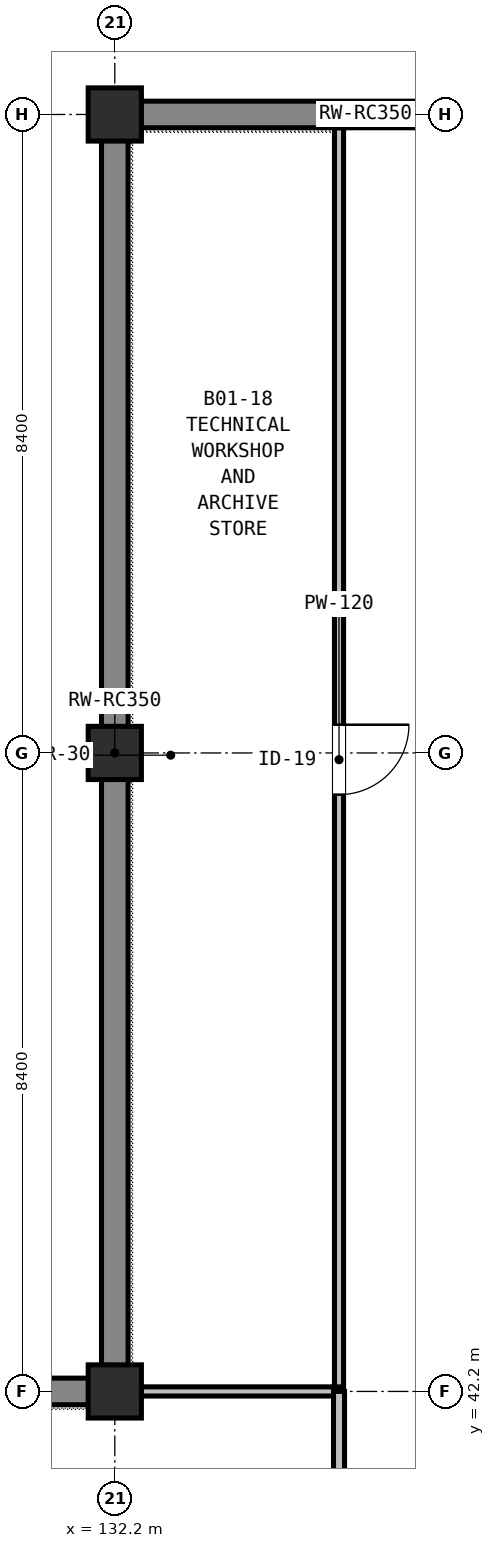
"""IFC4 building model, lengths in metres.
Left out: names, types, materials, properties, quantities, classifications, styles, units other than length and angle.
Written with IfcOpenShell. Run it as: python <this file> out.ifc"""

import sys

from ifc_helpers import new_model, si_unit, direction, frame, frame_2d, origin, origin_2d, place, context, subcontext, project, spatial, rectangle, extrude, element, fill, save


model = new_model("IFC4")
c1 = context("Model", 3, precision=1e-05, world=origin(), true_north=direction((0.0, 1.0)))
c2 = subcontext(c1, "Body", "Model", "MODEL_VIEW")
j1 = project(units=[si_unit("LENGTHUNIT", "METRE"), si_unit("PLANEANGLEUNIT", "RADIAN")], contexts=[c1])
p1 = place(None, origin())
s1 = spatial("IfcSite", under=j1, at=p1, CompositionType="ELEMENT")
p2 = place(p1, origin())
s2 = spatial("IfcBuilding", under=s1, at=p2, CompositionType="ELEMENT")
p3 = place(p2, frame((0.0, 0.0, -4.5)))
s3 = spatial("IfcBuildingStorey", under=s2, at=p3, CompositionType="ELEMENT", Elevation=-4.5)
for number, where, z_axis, x_axis in (
    (1, (132.2, 42.2, 0.0), (0.0, 0.0, 1.0), (1.0, 0.0, 0.0)),
    (2, (132.2, 50.6, 0.0), (0.0, 0.0, 1.0), (1.0, 0.0, 0.0)),
    (3, (132.2, 59.0, 0.0), (0.0, 0.0, 1.0), (1.0, 0.0, 0.0)),
):
    element("IfcColumn", number, at=place(p3, frame(where, z_axis=z_axis, x_axis=x_axis)), inside=s3, PredefinedType="COLUMN", context=c2, shape_type="SweptSolid", body=[
        extrude(rectangle(XDim=0.7, YDim=0.7, at=origin_2d()), origin(), (0.0, 0.0, 1.0), 4.5),
    ])
p4 = place(p3, frame((99.025, 42.2, 0.0), z_axis=(0.0, 0.0, 1.0), x_axis=(1.0, 0.0, 0.0)))
e4 = element("IfcWall", 4, at=p4, inside=s3, PredefinedType="SOLIDWALL", context=c2, shape_type="SweptSolid", body=[
    extrude(rectangle(XDim=33.35, YDim=0.35, at=frame_2d((16.675, 0.0))), origin(), (0.0, 0.0, 1.0), 4.5),
])
p5 = place(p3, frame((132.2, 42.375, 0.0), z_axis=(0.0, 0.0, 1.0), x_axis=(0.0, 1.0, 0.0)))
e5 = element("IfcWall", 5, at=p5, inside=s3, PredefinedType="SOLIDWALL", context=c2, shape_type="SweptSolid", body=[
    extrude(rectangle(XDim=16.45, YDim=0.35, at=frame_2d((8.225, 0.0))), origin(), (0.0, 0.0, 1.0), 4.5),
])
p6 = place(p3, frame((132.025, 59.0, 0.0), z_axis=(0.0, 0.0, 1.0), x_axis=(1.0, 0.0, 0.0)))
e6 = element("IfcWall", 6, at=p6, inside=s3, PredefinedType="SOLIDWALL", context=c2, shape_type="SweptSolid", body=[
    extrude(rectangle(XDim=6.95, YDim=0.35, at=frame_2d((3.475, 0.0))), origin(), (0.0, 0.0, 1.0), 4.5),
])
p7 = place(p3, frame((135.15, 58.823, 0.0), z_axis=(0.0, 0.0, 1.0), x_axis=(0.0, -1.0, 0.0)))
e7 = element("IfcWall", 7, at=p7, inside=s3, PredefinedType="PARTITIONING", context=c2, shape_type="SweptSolid", body=[
    extrude(rectangle(XDim=16.623, YDim=0.12, at=frame_2d((8.312, 0.0))), origin(), (0.0, 0.0, 1.0), 3.835),
])
p8 = place(p7, frame((7.852, 0.0, 0.0)))
e8 = element("IfcOpeningElement", 8, at=p8, cuts=e7, PredefinedType="OPENING", context=c2, shape_type="SweptSolid", body=[
    extrude(rectangle(XDim=0.92, YDim=2.14, at=frame_2d((0.46, 1.07))), frame((0.0, 0.07, 0.0), z_axis=(0.0, -1.0, 0.0), x_axis=(1.0, 0.0, 0.0)), (0.0, 0.0, 1.0), 0.14),
])
p9 = place(p3, frame((135.15, 42.2, 0.0), z_axis=(0.0, 0.0, 1.0), x_axis=(-1.0, 0.0, 0.0)))
e9 = element("IfcWall", 9, at=p9, inside=s3, PredefinedType="PARTITIONING", context=c2, shape_type="SweptSolid", body=[
    extrude(rectangle(XDim=2.6, YDim=0.12, at=frame_2d((1.3, 0.0))), origin(), (0.0, 0.0, 1.0), 3.835),
])
p10 = place(p3, frame((135.15, 42.2, 0.0), z_axis=(0.0, 0.0, 1.0), x_axis=(0.0, -1.0, 0.0)))
e10 = element("IfcWall", 10, at=p10, inside=s3, PredefinedType="PARTITIONING", context=c2, shape_type="SweptSolid", body=[
    extrude(rectangle(XDim=9.498, YDim=0.145, at=frame_2d((4.749, 0.0))), origin(), (0.0, 0.0, 1.0), 3.835),
])
p11 = place(p10, frame((4.029, 0.0, 0.0)))
e11 = element("IfcOpeningElement", 11, at=p11, cuts=e10, PredefinedType="OPENING", context=c2, shape_type="SweptSolid", body=[
    extrude(rectangle(XDim=1.44, YDim=2.14, at=frame_2d((0.72, 1.07))), frame((0.0, 0.083, 0.0), z_axis=(0.0, -1.0, 0.0), x_axis=(1.0, 0.0, 0.0)), (0.0, 0.0, 1.0), 0.165),
])
p12 = place(p8, origin())
e12 = element("IfcDoor", 12, at=p12, inside=s3, OperationType="SINGLE_SWING_LEFT", PredefinedType="DOOR", context=c2, shape_type="SweptSolid", body=[
    extrude(rectangle(XDim=0.92, YDim=2.14, at=frame_2d((0.46, 1.07))), frame((0.0, 0.025, 0.0), z_axis=(0.0, -1.0, 0.0), x_axis=(1.0, 0.0, 0.0)), (0.0, 0.0, 1.0), 0.05),
])
fill(e8, e12)
save(model, sys.argv[1])
